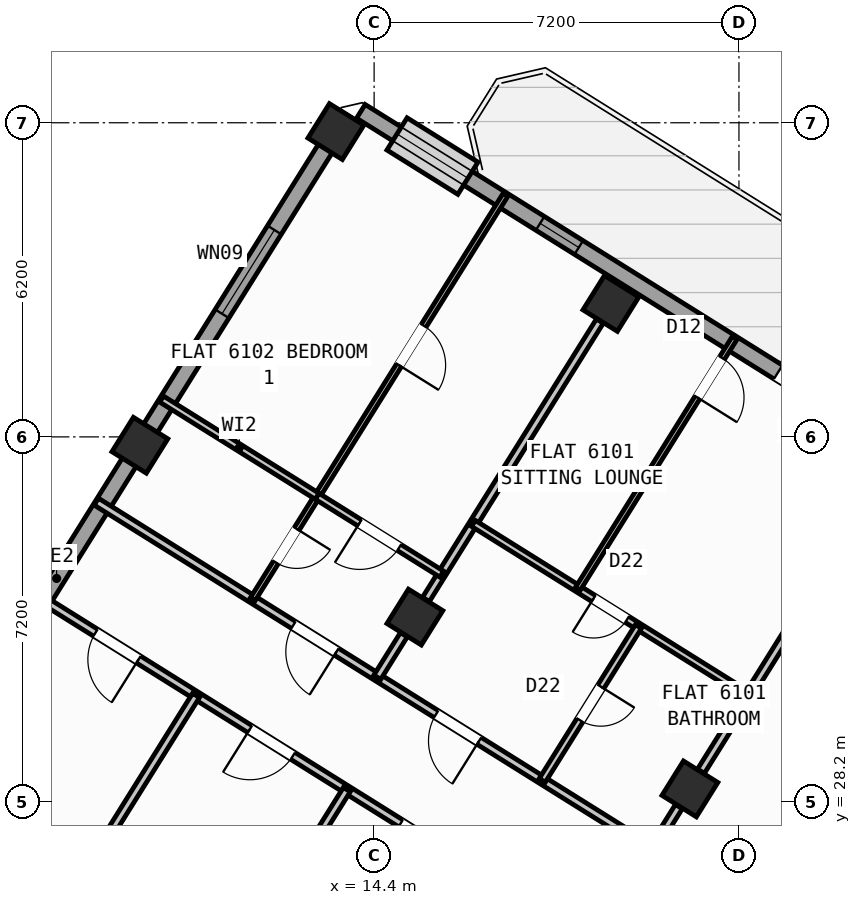
"""IFC4 building model, lengths in metres.
Left out: names, types, materials, properties, quantities, classifications, styles, units other than length and angle.
Written with IfcOpenShell. Run it as: python <this file> out.ifc"""

import sys

from ifc_helpers import new_model, si_unit, direction, frame, frame_2d, origin, origin_2d, place, context, subcontext, project, spatial, rectangle, hollow_rectangle, extrude, source, transform, mapped, element, fill, save


model = new_model("IFC4")
c1 = context("Model", 3, precision=1e-05, world=origin(), true_north=direction((0.0, 1.0)))
c2 = subcontext(c1, "Body", "Model", "MODEL_VIEW")
j1 = project(units=[si_unit("LENGTHUNIT", "METRE"), si_unit("PLANEANGLEUNIT", "RADIAN")], contexts=[c1])
p1 = place(None, origin())
s1 = spatial("IfcSite", under=j1, at=p1, CompositionType="ELEMENT")
p2 = place(p1, origin())
s2 = spatial("IfcBuilding", under=s1, at=p2, CompositionType="ELEMENT")
p3 = place(p2, frame((0.0, 0.0, 242.1)))
s3 = spatial("IfcBuildingStorey", under=s2, at=p3, CompositionType="ELEMENT", Elevation=242.1)
m1 = source(origin(), c2, "Body", "SweptSolid", [
    extrude(hollow_rectangle(XDim=0.8, YDim=0.8, WallThickness=0.032, at=origin_2d()), origin(), (0.0, 0.0, 1.0), 3.6),
])
for number, where, z_axis, x_axis in (
    (1, (20.632, 28.452, 0.0), (0.0, 0.0, 1.0), (-0.848, 0.53, 0.0)),
    (2, (19.073, 38.034, 0.0), (0.0, 0.0, 1.0), (-0.848, 0.53, 0.0)),
    (3, (15.205, 31.844, 0.0), (0.0, 0.0, 1.0), (-0.848, 0.53, 0.0)),
    (4, (13.646, 41.426, 0.0), (0.0, 0.0, 1.0), (-0.848, 0.53, 0.0)),
    (5, (9.777, 35.235, 0.0), (0.0, 0.0, 1.0), (-0.848, 0.53, 0.0)),
):
    element("IfcColumn", number, at=place(p3, frame(where, z_axis=z_axis, x_axis=x_axis)), inside=s3, PredefinedType="COLUMN", context=c2, shape_type="MappedRepresentation", body=[
        mapped(m1, transform((0.0, 0.0, 0.0), scale=1.0)),
    ])
p4 = place(p3, frame((2.415, 23.452, 0.0), z_axis=(0.0, 0.0, 1.0), x_axis=(0.52991049553, 0.848053575387, 0.0)))
e6 = element("IfcWall", 6, at=p4, inside=s3, PredefinedType="STANDARD", context=c2, shape_type="SweptSolid", body=[
    extrude(rectangle(XDim=21.587, YDim=0.32, at=frame_2d((10.794, 0.0))), origin(), (0.0, 0.0, 1.0), 2.845),
])
p5 = place(p4, frame((2.581, 0.0, 0.9)))
e7 = element("IfcOpeningElement", 7, at=p5, cuts=e6, PredefinedType="OPENING", context=c2, shape_type="SweptSolid", body=[
    extrude(rectangle(XDim=1.65, YDim=1.45, at=frame_2d((0.825, 0.725))), frame((0.0, 0.17, 0.0), z_axis=(0.0, -1.0, 0.0), x_axis=(1.0, 0.0, 0.0)), (0.0, 0.0, 1.0), 0.34),
])
p6 = place(p4, frame((7.879, 0.0, 0.9)))
e8 = element("IfcOpeningElement", 8, at=p6, cuts=e6, PredefinedType="OPENING", context=c2, shape_type="SweptSolid", body=[
    extrude(rectangle(XDim=1.35, YDim=1.45, at=frame_2d((0.675, 0.725))), frame((0.0, 0.17, 0.0), z_axis=(0.0, -1.0, 0.0), x_axis=(1.0, 0.0, 0.0)), (0.0, 0.0, 1.0), 0.34),
])
p7 = place(p4, frame((16.954, 0.0, 0.95)))
e9 = element("IfcOpeningElement", 9, at=p7, cuts=e6, PredefinedType="OPENING", context=c2, shape_type="SweptSolid", body=[
    extrude(rectangle(XDim=1.95, YDim=1.35, at=frame_2d((0.975, 0.675))), frame((0.0, 0.17, 0.0), z_axis=(0.0, -1.0, 0.0), x_axis=(1.0, 0.0, 0.0)), (0.0, 0.0, 1.0), 0.34),
])
p8 = place(p3, frame((14.138, 41.825, 0.0), z_axis=(0.0, 0.0, 1.0), x_axis=(0.848046498049, -0.529921821731, 0.0)))
e10 = element("IfcWall", 10, at=p8, inside=s3, PredefinedType="STANDARD", context=c2, shape_type="SweptSolid", body=[
    extrude(rectangle(XDim=31.588, YDim=0.32, at=frame_2d((15.794, 0.0))), origin(), (0.0, 0.0, 1.0), 3.32),
])
p9 = place(p8, frame((9.712, 0.0, 0.0)))
e11 = element("IfcOpeningElement", 11, at=p9, cuts=e10, PredefinedType="OPENING", context=c2, shape_type="SweptSolid", body=[
    extrude(rectangle(XDim=1.05, YDim=2.15, at=frame_2d((0.525, 1.075))), frame((0.0, 0.17, 0.0), z_axis=(0.0, -1.0, 0.0), x_axis=(1.0, 0.0, 0.0)), (0.0, 0.0, 1.0), 0.34),
])
p10 = place(p8, frame((0.841, 0.0, 0.9)))
e12 = element("IfcOpeningElement", 12, at=p10, cuts=e10, PredefinedType="OPENING", context=c2, shape_type="SweptSolid", body=[
    extrude(rectangle(XDim=1.65, YDim=1.45, at=frame_2d((0.825, 0.725))), frame((0.0, 0.17, 0.0), z_axis=(0.0, -1.0, 0.0), x_axis=(1.0, 0.0, 0.0)), (0.0, 0.0, 1.0), 0.34),
])
p11 = place(p8, frame((4.171, 0.0, 1.0)))
e13 = element("IfcOpeningElement", 13, at=p11, cuts=e10, PredefinedType="OPENING", context=c2, shape_type="SweptSolid", body=[
    extrude(rectangle(XDim=0.9, YDim=1.25, at=frame_2d((0.45, 0.625))), frame((0.0, 0.17, 0.0), z_axis=(0.0, -1.0, 0.0), x_axis=(1.0, 0.0, 0.0)), (0.0, 0.0, 1.0), 0.34),
])
p12 = place(p8, frame((13.624, 0.0, 0.95)))
e14 = element("IfcOpeningElement", 14, at=p12, cuts=e10, PredefinedType="OPENING", context=c2, shape_type="SweptSolid", body=[
    extrude(rectangle(XDim=1.95, YDim=1.35, at=frame_2d((0.975, 0.675))), frame((0.0, 0.17, 0.0), z_axis=(0.0, -1.0, 0.0), x_axis=(1.0, 0.0, 0.0)), (0.0, 0.0, 1.0), 0.34),
])
p13 = place(p8, frame((17.129, 0.0, 1.0)))
e15 = element("IfcOpeningElement", 15, at=p13, cuts=e10, PredefinedType="OPENING", context=c2, shape_type="SweptSolid", body=[
    extrude(rectangle(XDim=0.9, YDim=1.25, at=frame_2d((0.45, 0.625))), frame((0.0, 0.17, 0.0), z_axis=(0.0, -1.0, 0.0), x_axis=(1.0, 0.0, 0.0)), (0.0, 0.0, 1.0), 0.34),
])
p14 = place(p8, frame((21.744, 0.0, 0.9)))
e16 = element("IfcOpeningElement", 16, at=p14, cuts=e10, PredefinedType="OPENING", context=c2, shape_type="SweptSolid", body=[
    extrude(rectangle(XDim=1.65, YDim=1.45, at=frame_2d((0.825, 0.725))), frame((0.0, 0.17, 0.0), z_axis=(0.0, -1.0, 0.0), x_axis=(1.0, 0.0, 0.0)), (0.0, 0.0, 1.0), 0.34),
])
p15 = place(p8, frame((27.394, 0.0, 0.9)))
e17 = element("IfcOpeningElement", 17, at=p15, cuts=e10, PredefinedType="OPENING", context=c2, shape_type="SweptSolid", body=[
    extrude(rectangle(XDim=1.65, YDim=1.45, at=frame_2d((0.825, 0.725))), frame((0.0, 0.17, 0.0), z_axis=(0.0, -1.0, 0.0), x_axis=(1.0, 0.0, 0.0)), (0.0, 0.0, 1.0), 0.34),
])
p16 = place(p3, frame((23.104, 25.256, 0.0), z_axis=(0.0, 0.0, 1.0), x_axis=(-0.848041752158, 0.529929416617, 0.0)))
e18 = element("IfcWall", 18, at=p16, inside=s3, PredefinedType="PARTITIONING", context=c2, shape_type="SweptSolid", body=[
    extrude(rectangle(XDim=16.73, YDim=0.16, at=frame_2d((8.365, 0.0))), origin(), (0.0, 0.0, 1.0), 3.31),
])
p17 = place(p16, frame((1.395, 0.0, 0.0)))
e19 = element("IfcOpeningElement", 19, at=p17, cuts=e18, PredefinedType="OPENING", context=c2, shape_type="SweptSolid", body=[
    extrude(rectangle(XDim=1.0, YDim=2.1, at=frame_2d((0.5, 1.05))), frame((0.0, 0.09, 0.0), z_axis=(0.0, -1.0, 0.0), x_axis=(1.0, 0.0, 0.0)), (0.0, 0.0, 1.0), 0.18),
])
p18 = place(p16, frame((7.82, 0.0, 0.0)))
e20 = element("IfcOpeningElement", 20, at=p18, cuts=e18, PredefinedType="OPENING", context=c2, shape_type="SweptSolid", body=[
    extrude(rectangle(XDim=1.0, YDim=2.1, at=frame_2d((0.5, 1.05))), frame((0.0, 0.09, 0.0), z_axis=(0.0, -1.0, 0.0), x_axis=(1.0, 0.0, 0.0)), (0.0, 0.0, 1.0), 0.18),
])
p19 = place(p16, frame((11.14, 0.0, 0.0)))
e21 = element("IfcOpeningElement", 21, at=p19, cuts=e18, PredefinedType="OPENING", context=c2, shape_type="SweptSolid", body=[
    extrude(rectangle(XDim=1.0, YDim=2.1, at=frame_2d((0.5, 1.05))), frame((0.0, 0.09, 0.0), z_axis=(0.0, -1.0, 0.0), x_axis=(1.0, 0.0, 0.0)), (0.0, 0.0, 1.0), 0.18),
])
p20 = place(p3, frame((21.938, 23.391, 0.0), z_axis=(0.0, 0.0, 1.0), x_axis=(-0.848045850158, 0.529922858565, 0.0)))
e22 = element("IfcWall", 22, at=p20, inside=s3, PredefinedType="PARTITIONING", context=c2, shape_type="SweptSolid", body=[
    extrude(rectangle(XDim=16.73, YDim=0.16, at=frame_2d((8.365, 0.0))), origin(), (0.0, 0.0, 1.0), 3.31),
])
p21 = place(p20, frame((0.92, 0.0, 0.0)))
e23 = element("IfcOpeningElement", 23, at=p21, cuts=e22, PredefinedType="OPENING", context=c2, shape_type="SweptSolid", body=[
    extrude(rectangle(XDim=1.0, YDim=2.1, at=frame_2d((0.5, 1.05))), frame((0.0, 0.09, 0.0), z_axis=(0.0, -1.0, 0.0), x_axis=(1.0, 0.0, 0.0)), (0.0, 0.0, 1.0), 0.18),
])
p22 = place(p20, frame((3.928, 0.0, 0.0)))
e24 = element("IfcOpeningElement", 24, at=p22, cuts=e22, PredefinedType="OPENING", context=c2, shape_type="SweptSolid", body=[
    extrude(rectangle(XDim=1.0, YDim=2.1, at=frame_2d((0.5, 1.05))), frame((0.0, 0.09, 0.0), z_axis=(0.0, -1.0, 0.0), x_axis=(1.0, 0.0, 0.0)), (0.0, 0.0, 1.0), 0.18),
])
p23 = place(p20, frame((7.271, 0.0, 0.0)))
e25 = element("IfcOpeningElement", 25, at=p23, cuts=e22, PredefinedType="OPENING", context=c2, shape_type="SweptSolid", body=[
    extrude(rectangle(XDim=1.0, YDim=2.1, at=frame_2d((0.5, 1.05))), frame((0.0, 0.09, 0.0), z_axis=(0.0, -1.0, 0.0), x_axis=(1.0, 0.0, 0.0)), (0.0, 0.0, 1.0), 0.18),
])
p24 = place(p20, frame((10.78, 0.0, 0.0)))
e26 = element("IfcOpeningElement", 26, at=p24, cuts=e22, PredefinedType="OPENING", context=c2, shape_type="SweptSolid", body=[
    extrude(rectangle(XDim=1.0, YDim=2.1, at=frame_2d((0.5, 1.05))), frame((0.0, 0.09, 0.0), z_axis=(0.0, -1.0, 0.0), x_axis=(1.0, 0.0, 0.0)), (0.0, 0.0, 1.0), 0.18),
])
p25 = place(p20, frame((14.372, 0.0, 0.0)))
e27 = element("IfcOpeningElement", 27, at=p25, cuts=e22, PredefinedType="OPENING", context=c2, shape_type="SweptSolid", body=[
    extrude(rectangle(XDim=1.0, YDim=2.1, at=frame_2d((0.5, 1.05))), frame((0.0, 0.09, 0.0), z_axis=(0.0, -1.0, 0.0), x_axis=(1.0, 0.0, 0.0)), (0.0, 0.0, 1.0), 0.18),
])
p26 = place(p3, frame((13.861, 28.438, 0.0), z_axis=(0.0, 0.0, 1.0), x_axis=(-0.529931089283, -0.848040706931, 0.0)))
e28 = element("IfcWall", 28, at=p26, inside=s3, PredefinedType="PARTITIONING", context=c2, shape_type="SweptSolid", body=[
    extrude(rectangle(XDim=10.35, YDim=0.16, at=frame_2d((5.175, 0.0))), origin(), (0.0, 0.0, 1.0), 3.31),
])
p27 = place(p3, frame((10.885, 30.298, 0.0), z_axis=(0.0, 0.0, 1.0), x_axis=(-0.529924725692, -0.848044683434, 0.0)))
e29 = element("IfcWall", 29, at=p27, inside=s3, PredefinedType="PARTITIONING", context=c2, shape_type="SweptSolid", body=[
    extrude(rectangle(XDim=10.35, YDim=0.16, at=frame_2d((5.175, 0.0))), origin(), (0.0, 0.0, 1.0), 3.31),
])
p28 = place(p3, frame((24.282, 34.293, 0.0), z_axis=(0.0, 0.0, 1.0), x_axis=(-0.529934553702, -0.848038542045, 0.0)))
e30 = element("IfcWall", 30, at=p28, inside=s3, PredefinedType="PARTITIONING", context=c2, shape_type="SweptSolid", body=[
    extrude(rectangle(XDim=6.476, YDim=0.16, at=frame_2d((3.238, 0.0))), origin(), (0.0, 0.0, 1.0), 2.845),
])
p29 = place(p3, frame((20.414, 28.103, 0.0), z_axis=(0.0, 0.0, 1.0), x_axis=(-0.529998940003, -0.847998304005, 0.0)))
e31 = element("IfcWall", 31, at=p29, inside=s3, PredefinedType="PARTITIONING", context=c2, shape_type="SweptSolid", body=[
    extrude(rectangle(XDim=0.988, YDim=0.16, at=frame_2d((0.494, 0.0))), origin(), (0.0, 0.0, 1.0), 2.845),
])
p30 = place(p3, frame((18.854, 37.685, 0.0), z_axis=(0.0, 0.0, 1.0), x_axis=(-0.529907440938, -0.848055484057, 0.0)))
e32 = element("IfcWall", 32, at=p30, inside=s3, PredefinedType="PARTITIONING", context=c2, shape_type="SweptSolid", body=[
    extrude(rectangle(XDim=6.476, YDim=0.16, at=frame_2d((3.238, 0.0))), origin(), (0.0, 0.0, 1.0), 2.845),
])
p31 = place(p3, frame((14.986, 31.494, 0.0), z_axis=(0.0, 0.0, 1.0), x_axis=(-0.529821225456, -0.848109349704, 0.0)))
e33 = element("IfcWall", 33, at=p31, inside=s3, PredefinedType="PARTITIONING", context=c2, shape_type="SweptSolid", body=[
    extrude(rectangle(XDim=0.988, YDim=0.16, at=frame_2d((0.494, 0.0))), origin(), (0.0, 0.0, 1.0), 2.845),
])
p32 = place(p3, frame((21.787, 30.301, 0.0), z_axis=(0.0, 0.0, 1.0), x_axis=(-0.848049732085, 0.529916646191, 0.0)))
e34 = element("IfcWall", 34, at=p32, inside=s3, PredefinedType="PLUMBINGWALL", context=c2, shape_type="SweptSolid", body=[
    extrude(rectangle(XDim=6.4, YDim=0.14, at=frame_2d((3.2, 0.0))), origin(), (0.0, 0.0, 1.0), 3.31),
])
p33 = place(p32, frame((2.824, 0.0, 0.0)))
e35 = element("IfcOpeningElement", 35, at=p33, cuts=e34, PredefinedType="OPENING", context=c2, shape_type="SweptSolid", body=[
    extrude(rectangle(XDim=0.78, YDim=2.05, at=frame_2d((0.39, 1.025))), frame((0.0, 0.08, 0.0), z_axis=(0.0, -1.0, 0.0), x_axis=(1.0, 0.0, 0.0)), (0.0, 0.0, 1.0), 0.16),
])
p34 = place(p3, frame((19.616, 31.657, 0.0), z_axis=(0.0, 0.0, 1.0), x_axis=(-0.529876336437, -0.84807491891, 0.0)))
e36 = element("IfcWall", 36, at=p34, inside=s3, PredefinedType="PLUMBINGWALL", context=c2, shape_type="SweptSolid", body=[
    extrude(rectangle(XDim=3.58, YDim=0.14, at=frame_2d((1.79, 0.0))), origin(), (0.0, 0.0, 1.0), 3.31),
])
p35 = place(p34, frame((1.4, 0.0, 0.0)))
e37 = element("IfcOpeningElement", 37, at=p35, cuts=e36, PredefinedType="OPENING", context=c2, shape_type="SweptSolid", body=[
    extrude(rectangle(XDim=0.78, YDim=2.05, at=frame_2d((0.39, 1.025))), frame((0.0, 0.08, 0.0), z_axis=(0.0, -1.0, 0.0), x_axis=(1.0, 0.0, 0.0)), (0.0, 0.0, 1.0), 0.16),
])
p36 = place(p3, frame((21.517, 37.356, 0.0), z_axis=(0.0, 0.0, 1.0), x_axis=(-0.529916267533, -0.848049968695, 0.0)))
e38 = element("IfcWall", 38, at=p36, inside=s3, PredefinedType="PARTITIONING", context=c2, shape_type="SweptSolid", body=[
    extrude(rectangle(XDim=5.84, YDim=0.11, at=frame_2d((2.92, 0.0))), origin(), (0.0, 0.0, 1.0), 3.31),
])
p37 = place(p36, frame((0.47, 0.0, 0.0)))
e39 = element("IfcOpeningElement", 39, at=p37, cuts=e38, PredefinedType="OPENING", context=c2, shape_type="SweptSolid", body=[
    extrude(rectangle(XDim=0.92, YDim=2.08, at=frame_2d((0.46, 1.04))), frame((0.0, 0.065, 0.0), z_axis=(0.0, -1.0, 0.0), x_axis=(1.0, 0.0, 0.0)), (0.0, 0.0, 1.0), 0.13),
])
p38 = place(p3, frame((16.995, 40.182, 0.0), z_axis=(0.0, 0.0, 1.0), x_axis=(-0.529931378574, -0.848040526156, 0.0)))
e40 = element("IfcWall", 40, at=p38, inside=s3, PredefinedType="PARTITIONING", context=c2, shape_type="SweptSolid", body=[
    extrude(rectangle(XDim=9.42, YDim=0.11, at=frame_2d((4.71, 0.0))), origin(), (0.0, 0.0, 1.0), 3.31),
])
p39 = place(p38, frame((7.78, 0.0, 0.0)))
e41 = element("IfcOpeningElement", 41, at=p39, cuts=e40, PredefinedType="OPENING", context=c2, shape_type="SweptSolid", body=[
    extrude(rectangle(XDim=0.78, YDim=2.05, at=frame_2d((0.39, 1.025))), frame((0.0, 0.065, 0.0), z_axis=(0.0, -1.0, 0.0), x_axis=(1.0, 0.0, 0.0)), (0.0, 0.0, 1.0), 0.13),
])
p40 = place(p38, frame((3.05, 0.0, 0.0)))
e42 = element("IfcOpeningElement", 42, at=p40, cuts=e40, PredefinedType="OPENING", context=c2, shape_type="SweptSolid", body=[
    extrude(rectangle(XDim=0.92, YDim=2.08, at=frame_2d((0.46, 1.04))), frame((0.0, 0.065, 0.0), z_axis=(0.0, -1.0, 0.0), x_axis=(1.0, 0.0, 0.0)), (0.0, 0.0, 1.0), 0.13),
])
p41 = place(p3, frame((15.734, 32.692, 0.0), z_axis=(0.0, 0.0, 1.0), x_axis=(-0.848059786386, 0.529900555496, 0.0)))
e43 = element("IfcWall", 43, at=p41, inside=s3, PredefinedType="PLUMBINGWALL", context=c2, shape_type="SweptSolid", body=[
    extrude(rectangle(XDim=2.9, YDim=0.14, at=frame_2d((1.45, 0.0))), origin(), (0.0, 0.0, 1.0), 3.31),
])
p42 = place(p41, frame((0.99, 0.0, 0.0)))
e44 = element("IfcOpeningElement", 44, at=p42, cuts=e43, PredefinedType="OPENING", context=c2, shape_type="SweptSolid", body=[
    extrude(rectangle(XDim=0.92, YDim=2.08, at=frame_2d((0.46, 1.04))), frame((0.0, 0.08, 0.0), z_axis=(0.0, -1.0, 0.0), x_axis=(1.0, 0.0, 0.0)), (0.0, 0.0, 1.0), 0.16),
])
p43 = place(p3, frame((13.275, 34.228, 0.0), z_axis=(0.0, 0.0, 1.0), x_axis=(-0.848039976902, 0.529932257535, 0.0)))
e45 = element("IfcWall", 45, at=p43, inside=s3, PredefinedType="PLUMBINGWALL", context=c2, shape_type="SweptSolid", body=[
    extrude(rectangle(XDim=3.62, YDim=0.14, at=frame_2d((1.81, 0.0))), origin(), (0.0, 0.0, 1.0), 3.31),
])
m2 = source(origin(), c2, "Body", "SweptSolid", [
    extrude(rectangle(XDim=1.05, YDim=2.15, at=frame_2d((0.525, 1.075))), frame((0.0, 0.025, 0.0), z_axis=(0.0, -1.0, 0.0), x_axis=(1.0, 0.0, 0.0)), (0.0, 0.0, 1.0), 0.05),
])
p44 = place(p9, origin())
e46 = element("IfcDoor", 46, at=p44, inside=s3, OperationType="SINGLE_SWING_RIGHT", PredefinedType="DOOR", context=c2, shape_type="MappedRepresentation", body=[
    mapped(m2, transform((0.0, 0.0, 0.0), scale=1.0)),
])
fill(e11, e46)
m3 = source(origin(), c2, "Body", "SweptSolid", [
    extrude(rectangle(XDim=1.95, YDim=1.35, at=frame_2d((0.975, 0.675))), frame((0.0, 0.03, 0.0), z_axis=(0.0, -1.0, 0.0), x_axis=(1.0, 0.0, 0.0)), (0.0, 0.0, 1.0), 0.06),
])
p45 = place(p7, origin())
e47 = element("IfcWindow", 47, at=p45, inside=s3, PartitioningType="SINGLE_PANEL", PredefinedType="WINDOW", context=c2, shape_type="MappedRepresentation", body=[
    mapped(m3, transform((0.0, 0.0, 0.0), scale=1.0)),
])
fill(e9, e47)
m4 = source(origin(), c2, "Body", "SweptSolid", [
    extrude(rectangle(XDim=1.65, YDim=1.45, at=frame_2d((0.825, 0.725))), frame((0.0, 0.03, 0.0), z_axis=(0.0, -1.0, 0.0), x_axis=(1.0, 0.0, 0.0)), (0.0, 0.0, 1.0), 0.06),
])
p46 = place(p10, origin())
e48 = element("IfcWindow", 48, at=p46, inside=s3, PartitioningType="SINGLE_PANEL", PredefinedType="WINDOW", context=c2, shape_type="MappedRepresentation", body=[
    mapped(m4, transform((0.0, 0.0, 0.0), scale=1.0)),
])
fill(e12, e48)
m5 = source(origin(), c2, "Body", "SweptSolid", [
    extrude(rectangle(XDim=0.9, YDim=1.25, at=frame_2d((0.45, 0.625))), frame((0.0, 0.03, 0.0), z_axis=(0.0, -1.0, 0.0), x_axis=(1.0, 0.0, 0.0)), (0.0, 0.0, 1.0), 0.06),
])
p47 = place(p11, origin())
e49 = element("IfcWindow", 49, at=p47, inside=s3, PartitioningType="SINGLE_PANEL", PredefinedType="WINDOW", context=c2, shape_type="MappedRepresentation", body=[
    mapped(m5, transform((0.0, 0.0, 0.0), scale=1.0)),
])
fill(e13, e49)
m6 = source(origin(), c2, "Body", "SweptSolid", [
    extrude(rectangle(XDim=1.0, YDim=2.1, at=frame_2d((0.5, 1.05))), frame((0.0, 0.025, 0.0), z_axis=(0.0, -1.0, 0.0), x_axis=(1.0, 0.0, 0.0)), (0.0, 0.0, 1.0), 0.05),
])
p48 = place(p23, origin())
e50 = element("IfcDoor", 50, at=p48, inside=s3, OperationType="SINGLE_SWING_LEFT", PredefinedType="DOOR", context=c2, shape_type="MappedRepresentation", body=[
    mapped(m6, transform((0.0, 0.0, 0.0), scale=1.0)),
])
fill(e25, e50)
p49 = place(p24, origin())
e51 = element("IfcDoor", 51, at=p49, inside=s3, OperationType="SINGLE_SWING_RIGHT", PredefinedType="DOOR", context=c2, shape_type="MappedRepresentation", body=[
    mapped(m6, transform((0.0, 0.0, 0.0), scale=1.0)),
])
fill(e26, e51)
p50 = place(p25, origin())
e52 = element("IfcDoor", 52, at=p50, inside=s3, OperationType="SINGLE_SWING_LEFT", PredefinedType="DOOR", context=c2, shape_type="MappedRepresentation", body=[
    mapped(m6, transform((0.0, 0.0, 0.0), scale=1.0)),
])
fill(e27, e52)
m7 = source(origin(), c2, "Body", "SweptSolid", [
    extrude(rectangle(XDim=0.92, YDim=2.08, at=frame_2d((0.46, 1.04))), frame((0.0, 0.025, 0.0), z_axis=(0.0, -1.0, 0.0), x_axis=(1.0, 0.0, 0.0)), (0.0, 0.0, 1.0), 0.05),
])
p51 = place(p37, origin())
e53 = element("IfcDoor", 53, at=p51, inside=s3, OperationType="SINGLE_SWING_RIGHT", PredefinedType="DOOR", context=c2, shape_type="MappedRepresentation", body=[
    mapped(m7, transform((0.0, 0.0, 0.0), scale=1.0)),
])
fill(e39, e53)
p52 = place(p18, origin())
e54 = element("IfcDoor", 54, at=p52, inside=s3, OperationType="SINGLE_SWING_LEFT", PredefinedType="DOOR", context=c2, shape_type="MappedRepresentation", body=[
    mapped(m6, transform((0.0, 0.0, 0.0), scale=1.0)),
])
fill(e20, e54)
m8 = source(origin(), c2, "Body", "SweptSolid", [
    extrude(rectangle(XDim=0.78, YDim=2.05, at=frame_2d((0.39, 1.025))), frame((0.0, 0.025, 0.0), z_axis=(0.0, -1.0, 0.0), x_axis=(1.0, 0.0, 0.0)), (0.0, 0.0, 1.0), 0.05),
])
p53 = place(p33, origin())
e55 = element("IfcDoor", 55, at=p53, inside=s3, OperationType="SINGLE_SWING_RIGHT", PredefinedType="DOOR", context=c2, shape_type="MappedRepresentation", body=[
    mapped(m8, transform((0.0, 0.0, 0.0), scale=1.0)),
])
fill(e35, e55)
p54 = place(p35, origin())
e56 = element("IfcDoor", 56, at=p54, inside=s3, OperationType="SINGLE_SWING_LEFT", PredefinedType="DOOR", context=c2, shape_type="MappedRepresentation", body=[
    mapped(m8, transform((0.0, 0.0, 0.0), scale=1.0)),
])
fill(e37, e56)
p55 = place(p19, origin())
e57 = element("IfcDoor", 57, at=p55, inside=s3, OperationType="SINGLE_SWING_LEFT", PredefinedType="DOOR", context=c2, shape_type="MappedRepresentation", body=[
    mapped(m6, transform((0.0, 0.0, 0.0), scale=1.0)),
])
fill(e21, e57)
p56 = place(p42, origin())
e58 = element("IfcDoor", 58, at=p56, inside=s3, OperationType="SINGLE_SWING_RIGHT", PredefinedType="DOOR", context=c2, shape_type="MappedRepresentation", body=[
    mapped(m7, transform((0.0, 0.0, 0.0), scale=1.0)),
])
fill(e44, e58)
p57 = place(p39, origin())
e59 = element("IfcDoor", 59, at=p57, inside=s3, OperationType="SINGLE_SWING_LEFT", PredefinedType="DOOR", context=c2, shape_type="MappedRepresentation", body=[
    mapped(m8, transform((0.0, 0.0, 0.0), scale=1.0)),
])
fill(e41, e59)
p58 = place(p40, origin())
e60 = element("IfcDoor", 60, at=p58, inside=s3, OperationType="SINGLE_SWING_RIGHT", PredefinedType="DOOR", context=c2, shape_type="MappedRepresentation", body=[
    mapped(m7, transform((0.0, 0.0, 0.0), scale=1.0)),
])
fill(e42, e60)
save(model, sys.argv[1])
